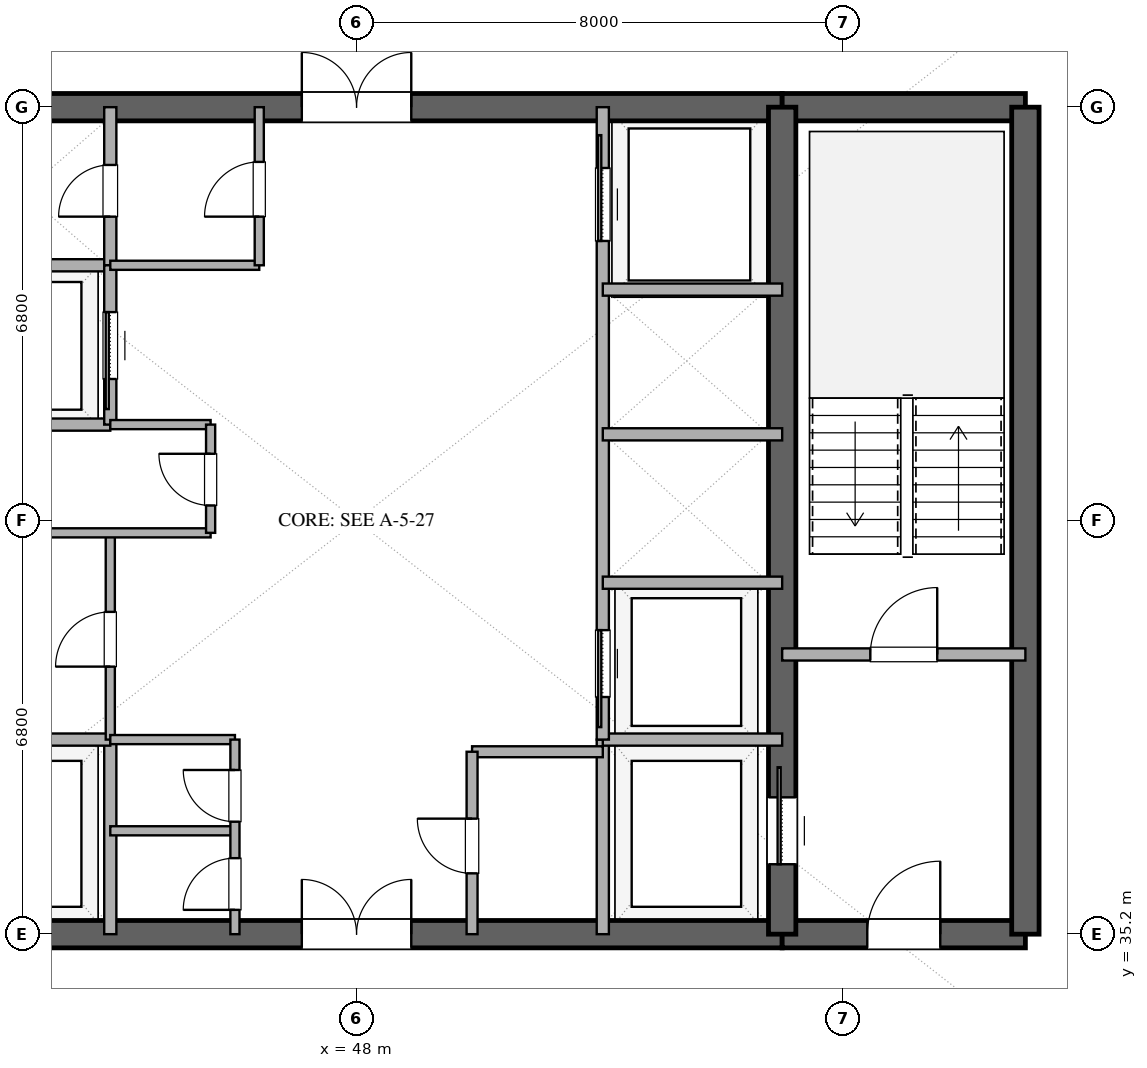
"""IFC4 building model, lengths in metres.
Left out: names, types, materials, properties, quantities, classifications, styles, units other than length and angle.
Written with IfcOpenShell. Run it as: python <this file> out.ifc"""

import sys

from ifc_helpers import new_model, si_unit, direction, frame, frame_2d, origin, place, context, subcontext, project, spatial, rectangle, extrude, element, fill, save


model = new_model("IFC4")
c1 = context("Model", 3, precision=1e-05, world=origin(), true_north=direction((0.0, 1.0)))
c2 = subcontext(c1, "Body", "Model", "MODEL_VIEW")
j1 = project(units=[si_unit("LENGTHUNIT", "METRE"), si_unit("PLANEANGLEUNIT", "RADIAN")], contexts=[c1])
p1 = place(None, origin())
s1 = spatial("IfcSite", under=j1, at=p1, CompositionType="ELEMENT")
p2 = place(p1, origin())
s2 = spatial("IfcBuilding", under=s1, at=p2, CompositionType="ELEMENT")
p3 = place(p2, frame((0.0, 0.0, 172.2)))
s3 = spatial("IfcBuildingStorey", under=s2, at=p3, CompositionType="ELEMENT", Elevation=172.2)
p4 = place(p3, frame((41.0, 35.2, 0.0), z_axis=(0.0, 0.0, 1.0), x_axis=(1.0, 0.0, 0.0)))
e1 = element("IfcWall", 1, at=p4, inside=s3, PredefinedType="SHEAR", context=c2, shape_type="SweptSolid", body=[
    extrude(rectangle(XDim=14.0, YDim=0.45, at=frame_2d((7.0, 0.0))), origin(), (0.0, 0.0, 1.0), 3.38),
])
p5 = place(p4, frame((6.1, 0.0, 0.0)))
e2 = element("IfcOpeningElement", 2, at=p5, cuts=e1, PredefinedType="OPENING", context=c2, shape_type="SweptSolid", body=[
    extrude(rectangle(XDim=1.8, YDim=2.25, at=frame_2d((0.9, 1.125))), frame((0.0, 0.235, 0.0), z_axis=(0.0, -1.0, 0.0), x_axis=(1.0, 0.0, 0.0)), (0.0, 0.0, 1.0), 0.47),
])
p6 = place(p3, frame((55.0, 35.2, 0.0), z_axis=(0.0, 0.0, 1.0), x_axis=(1.0, 0.0, 0.0)))
e3 = element("IfcWall", 3, at=p6, inside=s3, PredefinedType="SHEAR", context=c2, shape_type="SweptSolid", body=[
    extrude(rectangle(XDim=4.0, YDim=0.45, at=frame_2d((2.0, 0.0))), origin(), (0.0, 0.0, 1.0), 3.38),
])
p7 = place(p6, frame((1.4, 0.0, 0.0)))
e4 = element("IfcOpeningElement", 4, at=p7, cuts=e3, PredefinedType="OPENING", context=c2, shape_type="SweptSolid", body=[
    extrude(rectangle(XDim=1.2, YDim=2.15, at=frame_2d((0.6, 1.075))), frame((0.0, 0.235, 0.0), z_axis=(0.0, -1.0, 0.0), x_axis=(1.0, 0.0, 0.0)), (0.0, 0.0, 1.0), 0.47),
])
p8 = place(p3, frame((41.0, 48.8, 0.0), z_axis=(0.0, 0.0, 1.0), x_axis=(1.0, 0.0, 0.0)))
e5 = element("IfcWall", 5, at=p8, inside=s3, PredefinedType="SHEAR", context=c2, shape_type="SweptSolid", body=[
    extrude(rectangle(XDim=14.0, YDim=0.45, at=frame_2d((7.0, 0.0))), origin(), (0.0, 0.0, 1.0), 3.38),
])
p9 = place(p8, frame((6.1, 0.0, 0.0)))
e6 = element("IfcOpeningElement", 6, at=p9, cuts=e5, PredefinedType="OPENING", context=c2, shape_type="SweptSolid", body=[
    extrude(rectangle(XDim=1.8, YDim=2.25, at=frame_2d((0.9, 1.125))), frame((0.0, 0.235, 0.0), z_axis=(0.0, -1.0, 0.0), x_axis=(1.0, 0.0, 0.0)), (0.0, 0.0, 1.0), 0.47),
])
p10 = place(p3, frame((55.0, 48.8, 0.0), z_axis=(0.0, 0.0, 1.0), x_axis=(1.0, 0.0, 0.0)))
e7 = element("IfcWall", 7, at=p10, inside=s3, PredefinedType="SHEAR", context=c2, shape_type="SweptSolid", body=[
    extrude(rectangle(XDim=4.0, YDim=0.45, at=frame_2d((2.0, 0.0))), origin(), (0.0, 0.0, 1.0), 3.38),
])
p11 = place(p3, frame((59.0, 35.2, 0.0), z_axis=(0.0, 0.0, 1.0), x_axis=(0.0, 1.0, 0.0)))
e8 = element("IfcWall", 8, at=p11, inside=s3, PredefinedType="SHEAR", context=c2, shape_type="SweptSolid", body=[
    extrude(rectangle(XDim=13.6, YDim=0.45, at=frame_2d((6.8, 0.0))), origin(), (0.0, 0.0, 1.0), 3.38),
])
p12 = place(p3, frame((55.0, 35.2, 0.0), z_axis=(0.0, 0.0, 1.0), x_axis=(0.0, 1.0, 0.0)))
e9 = element("IfcWall", 9, at=p12, inside=s3, PredefinedType="SHEAR", context=c2, shape_type="SweptSolid", body=[
    extrude(rectangle(XDim=13.6, YDim=0.45, at=frame_2d((6.8, 0.0))), origin(), (0.0, 0.0, 1.0), 3.38),
])
p13 = place(p12, frame((1.15, 0.0, 0.0)))
e10 = element("IfcOpeningElement", 10, at=p13, cuts=e9, PredefinedType="OPENING", context=c2, shape_type="SweptSolid", body=[
    extrude(rectangle(XDim=1.1, YDim=2.2, at=frame_2d((0.55, 1.1))), frame((0.0, 0.235, 0.0), z_axis=(0.0, -1.0, 0.0), x_axis=(1.0, 0.0, 0.0)), (0.0, 0.0, 1.0), 0.47),
])
p14 = place(p3, frame((55.0, 39.8, 0.0), z_axis=(0.0, 0.0, 1.0), x_axis=(1.0, 0.0, 0.0)))
e11 = element("IfcWall", 11, at=p14, inside=s3, PredefinedType="SOLIDWALL", context=c2, shape_type="SweptSolid", body=[
    extrude(rectangle(XDim=4.0, YDim=0.2, at=frame_2d((2.0, 0.0))), origin(), (0.0, 0.0, 1.0), 2.74),
])
p15 = place(p14, frame((1.45, 0.0, 0.0)))
e12 = element("IfcOpeningElement", 12, at=p15, cuts=e11, PredefinedType="OPENING", context=c2, shape_type="SweptSolid", body=[
    extrude(rectangle(XDim=1.1, YDim=2.15, at=frame_2d((0.55, 1.075))), frame((0.0, 0.11, 0.0), z_axis=(0.0, -1.0, 0.0), x_axis=(1.0, 0.0, 0.0)), (0.0, 0.0, 1.0), 0.22),
])
p16 = place(p3, frame((43.95, 35.2, 0.0), z_axis=(0.0, 0.0, 1.0), x_axis=(0.0, 1.0, 0.0)))
e13 = element("IfcWall", 13, at=p16, inside=s3, PredefinedType="SOLIDWALL", context=c2, shape_type="SweptSolid", body=[
    extrude(rectangle(XDim=3.2, YDim=0.2, at=frame_2d((1.6, 0.0))), origin(), (0.0, 0.0, 1.0), 2.74),
])
p17 = place(p3, frame((41.0, 38.4, 0.0), z_axis=(0.0, 0.0, 1.0), x_axis=(1.0, 0.0, 0.0)))
e14 = element("IfcWall", 14, at=p17, inside=s3, PredefinedType="SOLIDWALL", context=c2, shape_type="SweptSolid", body=[
    extrude(rectangle(XDim=2.95, YDim=0.2, at=frame_2d((1.475, 0.0))), origin(), (0.0, 0.0, 1.0), 2.74),
])
p18 = place(p3, frame((52.05, 35.2, 0.0), z_axis=(0.0, 0.0, 1.0), x_axis=(0.0, 1.0, 0.0)))
e15 = element("IfcWall", 15, at=p18, inside=s3, PredefinedType="SOLIDWALL", context=c2, shape_type="SweptSolid", body=[
    extrude(rectangle(XDim=3.2, YDim=0.2, at=frame_2d((1.6, 0.0))), origin(), (0.0, 0.0, 1.0), 2.74),
])
for number, where, z_axis, x_axis in (
    (16, (52.05, 38.4, 0.0), (0.0, 0.0, 1.0), (1.0, 0.0, 0.0)),
    (17, (41.0, 46.2, 0.0), (0.0, 0.0, 1.0), (1.0, 0.0, 0.0)),
):
    element("IfcWall", number, at=place(p3, frame(where, z_axis=z_axis, x_axis=x_axis)), inside=s3, PredefinedType="SOLIDWALL", context=c2, shape_type="SweptSolid", body=[
        extrude(rectangle(XDim=2.95, YDim=0.2, at=frame_2d((1.475, 0.0))), origin(), (0.0, 0.0, 1.0), 2.74),
    ])
p19 = place(p3, frame((43.95, 46.2, 0.0), z_axis=(0.0, 0.0, 1.0), x_axis=(0.0, 1.0, 0.0)))
e18 = element("IfcWall", 18, at=p19, inside=s3, PredefinedType="SOLIDWALL", context=c2, shape_type="SweptSolid", body=[
    extrude(rectangle(XDim=2.6, YDim=0.2, at=frame_2d((1.3, 0.0))), origin(), (0.0, 0.0, 1.0), 2.74),
])
p20 = place(p19, frame((0.8, 0.0, 0.0)))
e19 = element("IfcOpeningElement", 19, at=p20, cuts=e18, PredefinedType="OPENING", context=c2, shape_type="SweptSolid", body=[
    extrude(rectangle(XDim=0.85, YDim=2.15, at=frame_2d((0.425, 1.075))), frame((0.0, 0.11, 0.0), z_axis=(0.0, -1.0, 0.0), x_axis=(1.0, 0.0, 0.0)), (0.0, 0.0, 1.0), 0.22),
])
p21 = place(p3, frame((41.0, 43.58, 0.0), z_axis=(0.0, 0.0, 1.0), x_axis=(1.0, 0.0, 0.0)))
e20 = element("IfcWall", 20, at=p21, inside=s3, PredefinedType="SOLIDWALL", context=c2, shape_type="SweptSolid", body=[
    extrude(rectangle(XDim=2.95, YDim=0.2, at=frame_2d((1.475, 0.0))), origin(), (0.0, 0.0, 1.0), 2.74),
])
p22 = place(p3, frame((43.95, 43.58, 0.0), z_axis=(0.0, 0.0, 1.0), x_axis=(0.0, 1.0, 0.0)))
e21 = element("IfcWall", 21, at=p22, inside=s3, PredefinedType="SOLIDWALL", context=c2, shape_type="SweptSolid", body=[
    extrude(rectangle(XDim=2.62, YDim=0.2, at=frame_2d((1.31, 0.0))), origin(), (0.0, 0.0, 1.0), 2.74),
])
p23 = place(p22, frame((0.75, 0.0, 0.0)))
e22 = element("IfcOpeningElement", 22, at=p23, cuts=e21, PredefinedType="OPENING", context=c2, shape_type="SweptSolid", body=[
    extrude(rectangle(XDim=1.1, YDim=2.2, at=frame_2d((0.55, 1.1))), frame((0.0, 0.11, 0.0), z_axis=(0.0, -1.0, 0.0), x_axis=(1.0, 0.0, 0.0)), (0.0, 0.0, 1.0), 0.22),
])
p24 = place(p3, frame((43.95, 38.4, 0.0), z_axis=(0.0, 0.0, 1.0), x_axis=(0.0, 1.0, 0.0)))
e23 = element("IfcWall", 23, at=p24, inside=s3, PredefinedType="PARTITIONING", context=c2, shape_type="SweptSolid", body=[
    extrude(rectangle(XDim=3.4, YDim=0.15, at=frame_2d((1.7, 0.0))), origin(), (0.0, 0.0, 1.0), 2.74),
])
p25 = place(p24, frame((1.2, 0.0, 0.0)))
e24 = element("IfcOpeningElement", 24, at=p25, cuts=e23, PredefinedType="OPENING", context=c2, shape_type="SweptSolid", body=[
    extrude(rectangle(XDim=0.9, YDim=2.15, at=frame_2d((0.45, 1.075))), frame((0.0, 0.085, 0.0), z_axis=(0.0, -1.0, 0.0), x_axis=(1.0, 0.0, 0.0)), (0.0, 0.0, 1.0), 0.17),
])
p26 = place(p3, frame((41.0, 41.8, 0.0), z_axis=(0.0, 0.0, 1.0), x_axis=(1.0, 0.0, 0.0)))
e25 = element("IfcWall", 25, at=p26, inside=s3, PredefinedType="PARTITIONING", context=c2, shape_type="SweptSolid", body=[
    extrude(rectangle(XDim=4.6, YDim=0.15, at=frame_2d((2.3, 0.0))), origin(), (0.0, 0.0, 1.0), 2.74),
])
p27 = place(p3, frame((43.95, 43.58, 0.0), z_axis=(0.0, 0.0, 1.0), x_axis=(1.0, 0.0, 0.0)))
e26 = element("IfcWall", 26, at=p27, inside=s3, PredefinedType="PARTITIONING", context=c2, shape_type="SweptSolid", body=[
    extrude(rectangle(XDim=1.65, YDim=0.15, at=frame_2d((0.825, 0.0))), origin(), (0.0, 0.0, 1.0), 2.74),
])
p28 = place(p3, frame((45.6, 41.8, 0.0), z_axis=(0.0, 0.0, 1.0), x_axis=(0.0, 1.0, 0.0)))
e27 = element("IfcWall", 27, at=p28, inside=s3, PredefinedType="PARTITIONING", context=c2, shape_type="SweptSolid", body=[
    extrude(rectangle(XDim=1.78, YDim=0.15, at=frame_2d((0.89, 0.0))), origin(), (0.0, 0.0, 1.0), 2.74),
])
p29 = place(p28, frame((0.45, 0.0, 0.0)))
e28 = element("IfcOpeningElement", 28, at=p29, cuts=e27, PredefinedType="OPENING", context=c2, shape_type="SweptSolid", body=[
    extrude(rectangle(XDim=0.85, YDim=2.15, at=frame_2d((0.425, 1.075))), frame((0.0, 0.085, 0.0), z_axis=(0.0, -1.0, 0.0), x_axis=(1.0, 0.0, 0.0)), (0.0, 0.0, 1.0), 0.17),
])
p30 = place(p3, frame((52.05, 38.4, 0.0), z_axis=(0.0, 0.0, 1.0), x_axis=(0.0, 1.0, 0.0)))
e29 = element("IfcWall", 29, at=p30, inside=s3, PredefinedType="SOLIDWALL", context=c2, shape_type="SweptSolid", body=[
    extrude(rectangle(XDim=10.4, YDim=0.2, at=frame_2d((5.2, 0.0))), origin(), (0.0, 0.0, 1.0), 2.74),
])
p31 = place(p30, frame((0.7, 0.0, 0.0)))
e30 = element("IfcOpeningElement", 30, at=p31, cuts=e29, PredefinedType="OPENING", context=c2, shape_type="SweptSolid", body=[
    extrude(rectangle(XDim=1.1, YDim=2.2, at=frame_2d((0.55, 1.1))), frame((0.0, 0.11, 0.0), z_axis=(0.0, -1.0, 0.0), x_axis=(1.0, 0.0, 0.0)), (0.0, 0.0, 1.0), 0.22),
])
p32 = place(p30, frame((8.2, 0.0, 0.0)))
e31 = element("IfcOpeningElement", 31, at=p32, cuts=e29, PredefinedType="OPENING", context=c2, shape_type="SweptSolid", body=[
    extrude(rectangle(XDim=1.2, YDim=2.2, at=frame_2d((0.6, 1.1))), frame((0.0, 0.11, 0.0), z_axis=(0.0, -1.0, 0.0), x_axis=(1.0, 0.0, 0.0)), (0.0, 0.0, 1.0), 0.22),
])
for number, where, z_axis, x_axis in (
    (32, (52.05, 40.98, 0.0), (0.0, 0.0, 1.0), (1.0, 0.0, 0.0)),
    (33, (52.05, 43.42, 0.0), (0.0, 0.0, 1.0), (1.0, 0.0, 0.0)),
    (34, (52.05, 45.8, 0.0), (0.0, 0.0, 1.0), (1.0, 0.0, 0.0)),
):
    element("IfcWall", number, at=place(p3, frame(where, z_axis=z_axis, x_axis=x_axis)), inside=s3, PredefinedType="SOLIDWALL", context=c2, shape_type="SweptSolid", body=[
        extrude(rectangle(XDim=2.95, YDim=0.2, at=frame_2d((1.475, 0.0))), origin(), (0.0, 0.0, 1.0), 2.74),
    ])
for number, where, z_axis, x_axis in (
    (35, (43.95, 36.9, 0.0), (0.0, 0.0, 1.0), (1.0, 0.0, 0.0)),
    (36, (43.95, 38.4, 0.0), (0.0, 0.0, 1.0), (1.0, 0.0, 0.0)),
):
    element("IfcWall", number, at=place(p3, frame(where, z_axis=z_axis, x_axis=x_axis)), inside=s3, PredefinedType="PARTITIONING", context=c2, shape_type="SweptSolid", body=[
        extrude(rectangle(XDim=2.05, YDim=0.15, at=frame_2d((1.025, 0.0))), origin(), (0.0, 0.0, 1.0), 2.74),
    ])
p33 = place(p3, frame((46.0, 35.2, 0.0), z_axis=(0.0, 0.0, 1.0), x_axis=(0.0, 1.0, 0.0)))
e37 = element("IfcWall", 37, at=p33, inside=s3, PredefinedType="PARTITIONING", context=c2, shape_type="SweptSolid", body=[
    extrude(rectangle(XDim=3.2, YDim=0.15, at=frame_2d((1.6, 0.0))), origin(), (0.0, 0.0, 1.0), 2.74),
])
p34 = place(p33, frame((0.4, 0.0, 0.0)))
e38 = element("IfcOpeningElement", 38, at=p34, cuts=e37, PredefinedType="OPENING", context=c2, shape_type="SweptSolid", body=[
    extrude(rectangle(XDim=0.85, YDim=2.15, at=frame_2d((0.425, 1.075))), frame((0.0, 0.085, 0.0), z_axis=(0.0, -1.0, 0.0), x_axis=(1.0, 0.0, 0.0)), (0.0, 0.0, 1.0), 0.17),
])
p35 = place(p33, frame((1.85, 0.0, 0.0)))
e39 = element("IfcOpeningElement", 39, at=p35, cuts=e37, PredefinedType="OPENING", context=c2, shape_type="SweptSolid", body=[
    extrude(rectangle(XDim=0.85, YDim=2.15, at=frame_2d((0.425, 1.075))), frame((0.0, 0.085, 0.0), z_axis=(0.0, -1.0, 0.0), x_axis=(1.0, 0.0, 0.0)), (0.0, 0.0, 1.0), 0.17),
])
p36 = place(p3, frame((43.95, 46.2, 0.0), z_axis=(0.0, 0.0, 1.0), x_axis=(1.0, 0.0, 0.0)))
e40 = element("IfcWall", 40, at=p36, inside=s3, PredefinedType="PARTITIONING", context=c2, shape_type="SweptSolid", body=[
    extrude(rectangle(XDim=2.45, YDim=0.15, at=frame_2d((1.225, 0.0))), origin(), (0.0, 0.0, 1.0), 2.74),
])
p37 = place(p3, frame((46.4, 46.2, 0.0), z_axis=(0.0, 0.0, 1.0), x_axis=(0.0, 1.0, 0.0)))
e41 = element("IfcWall", 41, at=p37, inside=s3, PredefinedType="PARTITIONING", context=c2, shape_type="SweptSolid", body=[
    extrude(rectangle(XDim=2.6, YDim=0.15, at=frame_2d((1.3, 0.0))), origin(), (0.0, 0.0, 1.0), 2.74),
])
p38 = place(p37, frame((0.8, 0.0, 0.0)))
e42 = element("IfcOpeningElement", 42, at=p38, cuts=e41, PredefinedType="OPENING", context=c2, shape_type="SweptSolid", body=[
    extrude(rectangle(XDim=0.9, YDim=2.15, at=frame_2d((0.45, 1.075))), frame((0.0, 0.085, 0.0), z_axis=(0.0, -1.0, 0.0), x_axis=(1.0, 0.0, 0.0)), (0.0, 0.0, 1.0), 0.17),
])
p39 = place(p3, frame((49.9, 38.2, 0.0), z_axis=(0.0, 0.0, 1.0), x_axis=(1.0, 0.0, 0.0)))
e43 = element("IfcWall", 43, at=p39, inside=s3, PredefinedType="PLUMBINGWALL", context=c2, shape_type="SweptSolid", body=[
    extrude(rectangle(XDim=2.15, YDim=0.18, at=frame_2d((1.075, 0.0))), origin(), (0.0, 0.0, 1.0), 2.74),
])
p40 = place(p3, frame((49.9, 35.2, 0.0), z_axis=(0.0, 0.0, 1.0), x_axis=(0.0, 1.0, 0.0)))
e44 = element("IfcWall", 44, at=p40, inside=s3, PredefinedType="PLUMBINGWALL", context=c2, shape_type="SweptSolid", body=[
    extrude(rectangle(XDim=3.0, YDim=0.18, at=frame_2d((1.5, 0.0))), origin(), (0.0, 0.0, 1.0), 2.74),
])
p41 = place(p40, frame((1.0, 0.0, 0.0)))
e45 = element("IfcOpeningElement", 45, at=p41, cuts=e44, PredefinedType="OPENING", context=c2, shape_type="SweptSolid", body=[
    extrude(rectangle(XDim=0.9, YDim=2.1, at=frame_2d((0.45, 1.05))), frame((0.0, 0.1, 0.0), z_axis=(0.0, -1.0, 0.0), x_axis=(1.0, 0.0, 0.0)), (0.0, 0.0, 1.0), 0.2),
])
p42 = place(p13, origin())
e46 = element("IfcDoor", 46, at=p42, inside=s3, OperationType="SLIDING_TO_RIGHT", PredefinedType="DOOR", context=c2, shape_type="SweptSolid", body=[
    extrude(rectangle(XDim=1.1, YDim=2.2, at=frame_2d((0.55, 1.1))), frame((0.0, 0.025, 0.0), z_axis=(0.0, -1.0, 0.0), x_axis=(1.0, 0.0, 0.0)), (0.0, 0.0, 1.0), 0.05),
])
fill(e10, e46)
p43 = place(p7, origin())
e47 = element("IfcDoor", 47, at=p43, inside=s3, OperationType="SINGLE_SWING_RIGHT", PredefinedType="DOOR", context=c2, shape_type="SweptSolid", body=[
    extrude(rectangle(XDim=1.2, YDim=2.15, at=frame_2d((0.6, 1.075))), frame((0.0, 0.025, 0.0), z_axis=(0.0, -1.0, 0.0), x_axis=(1.0, 0.0, 0.0)), (0.0, 0.0, 1.0), 0.05),
])
fill(e4, e47)
p44 = place(p5, origin())
e48 = element("IfcDoor", 48, at=p44, inside=s3, OperationType="DOUBLE_DOOR_SINGLE_SWING", PredefinedType="DOOR", context=c2, shape_type="SweptSolid", body=[
    extrude(rectangle(XDim=1.8, YDim=2.25, at=frame_2d((0.9, 1.125))), frame((0.0, 0.025, 0.0), z_axis=(0.0, -1.0, 0.0), x_axis=(1.0, 0.0, 0.0)), (0.0, 0.0, 1.0), 0.05),
])
fill(e2, e48)
p45 = place(p9, origin())
e49 = element("IfcDoor", 49, at=p45, inside=s3, OperationType="DOUBLE_DOOR_SINGLE_SWING", PredefinedType="DOOR", context=c2, shape_type="SweptSolid", body=[
    extrude(rectangle(XDim=1.8, YDim=2.25, at=frame_2d((0.9, 1.125))), frame((0.0, 0.025, 0.0), z_axis=(0.0, -1.0, 0.0), x_axis=(1.0, 0.0, 0.0)), (0.0, 0.0, 1.0), 0.05),
])
fill(e6, e49)
p46 = place(p15, origin())
e50 = element("IfcDoor", 50, at=p46, inside=s3, OperationType="SINGLE_SWING_RIGHT", PredefinedType="DOOR", context=c2, shape_type="SweptSolid", body=[
    extrude(rectangle(XDim=1.1, YDim=2.15, at=frame_2d((0.55, 1.075))), frame((0.0, 0.025, 0.0), z_axis=(0.0, -1.0, 0.0), x_axis=(1.0, 0.0, 0.0)), (0.0, 0.0, 1.0), 0.05),
])
fill(e12, e50)
p47 = place(p20, origin())
e51 = element("IfcDoor", 51, at=p47, inside=s3, OperationType="SINGLE_SWING_LEFT", PredefinedType="DOOR", context=c2, shape_type="SweptSolid", body=[
    extrude(rectangle(XDim=0.85, YDim=2.15, at=frame_2d((0.425, 1.075))), frame((0.0, 0.025, 0.0), z_axis=(0.0, -1.0, 0.0), x_axis=(1.0, 0.0, 0.0)), (0.0, 0.0, 1.0), 0.05),
])
fill(e19, e51)
p48 = place(p23, origin())
e52 = element("IfcDoor", 52, at=p48, inside=s3, OperationType="SLIDING_TO_LEFT", PredefinedType="DOOR", context=c2, shape_type="SweptSolid", body=[
    extrude(rectangle(XDim=1.1, YDim=2.2, at=frame_2d((0.55, 1.1))), frame((0.0, 0.025, 0.0), z_axis=(0.0, -1.0, 0.0), x_axis=(1.0, 0.0, 0.0)), (0.0, 0.0, 1.0), 0.05),
])
fill(e22, e52)
p49 = place(p25, origin())
e53 = element("IfcDoor", 53, at=p49, inside=s3, OperationType="SINGLE_SWING_LEFT", PredefinedType="DOOR", context=c2, shape_type="SweptSolid", body=[
    extrude(rectangle(XDim=0.9, YDim=2.15, at=frame_2d((0.45, 1.075))), frame((0.0, 0.025, 0.0), z_axis=(0.0, -1.0, 0.0), x_axis=(1.0, 0.0, 0.0)), (0.0, 0.0, 1.0), 0.05),
])
fill(e24, e53)
p50 = place(p29, origin())
e54 = element("IfcDoor", 54, at=p50, inside=s3, OperationType="SINGLE_SWING_RIGHT", PredefinedType="DOOR", context=c2, shape_type="SweptSolid", body=[
    extrude(rectangle(XDim=0.85, YDim=2.15, at=frame_2d((0.425, 1.075))), frame((0.0, 0.025, 0.0), z_axis=(0.0, -1.0, 0.0), x_axis=(1.0, 0.0, 0.0)), (0.0, 0.0, 1.0), 0.05),
])
fill(e28, e54)
p51 = place(p31, origin())
e55 = element("IfcDoor", 55, at=p51, inside=s3, OperationType="SLIDING_TO_LEFT", PredefinedType="DOOR", context=c2, shape_type="SweptSolid", body=[
    extrude(rectangle(XDim=1.1, YDim=2.2, at=frame_2d((0.55, 1.1))), frame((0.0, 0.025, 0.0), z_axis=(0.0, -1.0, 0.0), x_axis=(1.0, 0.0, 0.0)), (0.0, 0.0, 1.0), 0.05),
])
fill(e30, e55)
p52 = place(p32, origin())
e56 = element("IfcDoor", 56, at=p52, inside=s3, OperationType="SLIDING_TO_RIGHT", PredefinedType="DOOR", context=c2, shape_type="SweptSolid", body=[
    extrude(rectangle(XDim=1.2, YDim=2.2, at=frame_2d((0.6, 1.1))), frame((0.0, 0.025, 0.0), z_axis=(0.0, -1.0, 0.0), x_axis=(1.0, 0.0, 0.0)), (0.0, 0.0, 1.0), 0.05),
])
fill(e31, e56)
p53 = place(p34, origin())
e57 = element("IfcDoor", 57, at=p53, inside=s3, OperationType="SINGLE_SWING_LEFT", PredefinedType="DOOR", context=c2, shape_type="SweptSolid", body=[
    extrude(rectangle(XDim=0.85, YDim=2.15, at=frame_2d((0.425, 1.075))), frame((0.0, 0.025, 0.0), z_axis=(0.0, -1.0, 0.0), x_axis=(1.0, 0.0, 0.0)), (0.0, 0.0, 1.0), 0.05),
])
fill(e38, e57)
p54 = place(p35, origin())
e58 = element("IfcDoor", 58, at=p54, inside=s3, OperationType="SINGLE_SWING_RIGHT", PredefinedType="DOOR", context=c2, shape_type="SweptSolid", body=[
    extrude(rectangle(XDim=0.85, YDim=2.15, at=frame_2d((0.425, 1.075))), frame((0.0, 0.025, 0.0), z_axis=(0.0, -1.0, 0.0), x_axis=(1.0, 0.0, 0.0)), (0.0, 0.0, 1.0), 0.05),
])
fill(e39, e58)
p55 = place(p38, origin())
e59 = element("IfcDoor", 59, at=p55, inside=s3, OperationType="SINGLE_SWING_LEFT", PredefinedType="DOOR", context=c2, shape_type="SweptSolid", body=[
    extrude(rectangle(XDim=0.9, YDim=2.15, at=frame_2d((0.45, 1.075))), frame((0.0, 0.025, 0.0), z_axis=(0.0, -1.0, 0.0), x_axis=(1.0, 0.0, 0.0)), (0.0, 0.0, 1.0), 0.05),
])
fill(e42, e59)
p56 = place(p41, origin())
e60 = element("IfcDoor", 60, at=p56, inside=s3, OperationType="SINGLE_SWING_RIGHT", PredefinedType="DOOR", context=c2, shape_type="SweptSolid", body=[
    extrude(rectangle(XDim=0.9, YDim=2.1, at=frame_2d((0.45, 1.05))), frame((0.0, 0.025, 0.0), z_axis=(0.0, -1.0, 0.0), x_axis=(1.0, 0.0, 0.0)), (0.0, 0.0, 1.0), 0.05),
])
fill(e45, e60)
save(model, sys.argv[1])
